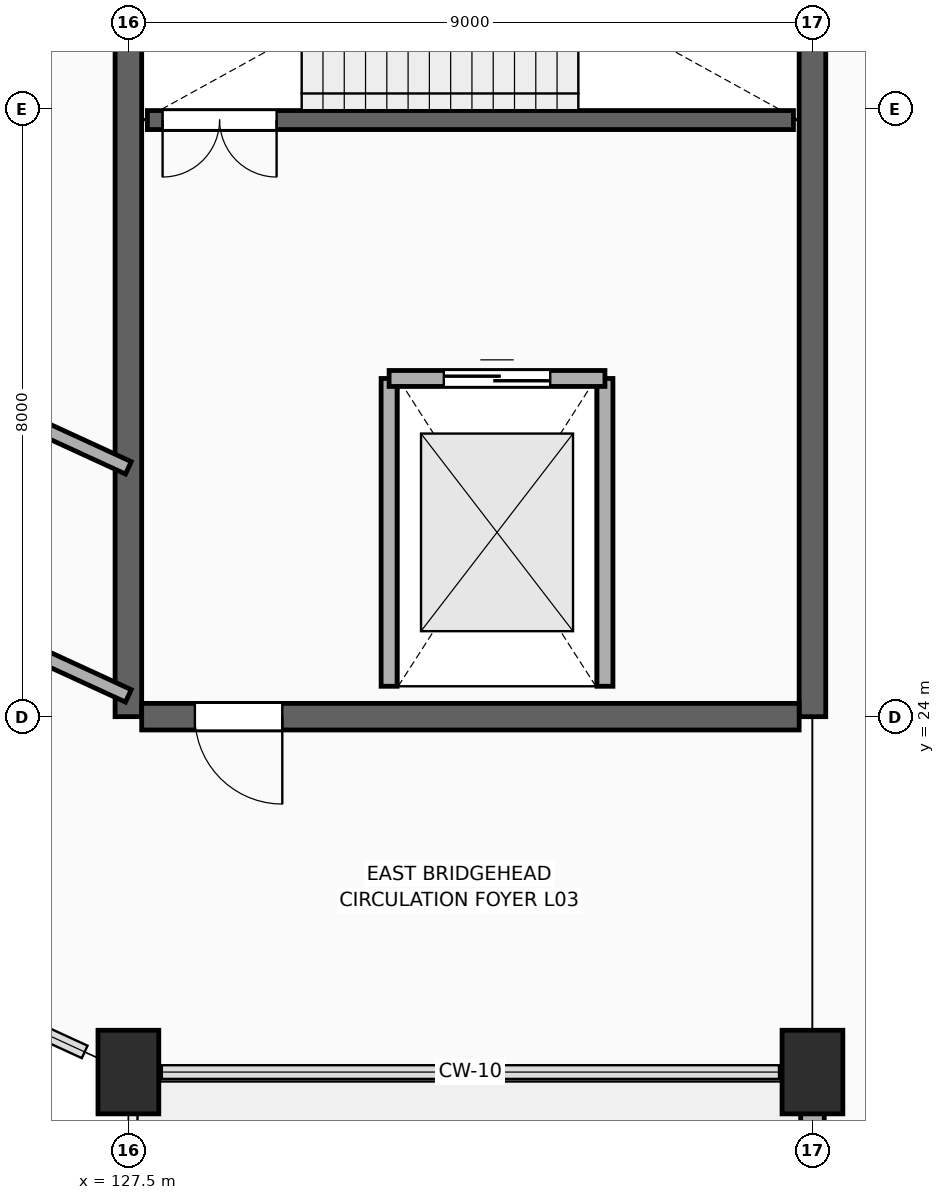
"""IFC4 building model, lengths in metres.
Left out: names, types, materials, properties, quantities, classifications, styles, units other than length and angle.
Written with IfcOpenShell. Run it as: python <this file> out.ifc"""

import sys

from ifc_helpers import new_model, si_unit, direction, frame, frame_2d, origin, origin_2d, place, context, subcontext, project, spatial, rectangle, extrude, element, fill, save


model = new_model("IFC4")
c1 = context("Model", 3, precision=1e-05, world=origin(), true_north=direction((0.0, 1.0)))
c2 = subcontext(c1, "Body", "Model", "MODEL_VIEW")
j1 = project(units=[si_unit("LENGTHUNIT", "METRE"), si_unit("PLANEANGLEUNIT", "RADIAN")], contexts=[c1])
p1 = place(None, origin())
s1 = spatial("IfcSite", under=j1, at=p1, CompositionType="ELEMENT")
p2 = place(p1, origin())
s2 = spatial("IfcBuilding", under=s1, at=p2, CompositionType="ELEMENT")
p3 = place(p2, frame((0.0, 0.0, 15.0)))
s3 = spatial("IfcBuildingStorey", under=s2, at=p3, CompositionType="ELEMENT", Elevation=15.0)
for number, where, z_axis, x_axis in (
    (1, (127.5, 24.0, 0.0), (0.0, 0.0, 1.0), (0.0, 1.0, 0.0)),
    (2, (136.5, 24.0, 0.0), (0.0, 0.0, 1.0), (0.0, 1.0, 0.0)),
):
    element("IfcWall", number, at=place(p3, frame(where, z_axis=z_axis, x_axis=x_axis)), inside=s3, PredefinedType="SHEAR", context=c2, shape_type="SweptSolid", body=[
        extrude(rectangle(XDim=12.8, YDim=0.35, at=frame_2d((6.4, 0.0))), origin(), (0.0, 0.0, 1.0), 4.64),
    ])
p4 = place(p3, frame((127.675, 24.0, 0.0), z_axis=(0.0, 0.0, 1.0), x_axis=(1.0, 0.0, 0.0)))
e3 = element("IfcWall", 3, at=p4, inside=s3, PredefinedType="SHEAR", context=c2, shape_type="SweptSolid", body=[
    extrude(rectangle(XDim=8.65, YDim=0.35, at=frame_2d((4.325, 0.0))), origin(), (0.0, 0.0, 1.0), 4.64),
])
p5 = place(p4, frame((0.7, 0.0, 0.0)))
e4 = element("IfcOpeningElement", 4, at=p5, cuts=e3, PredefinedType="OPENING", context=c2, shape_type="SweptSolid", body=[
    extrude(rectangle(XDim=1.15, YDim=2.2, at=frame_2d((0.575, 1.1))), frame((0.0, 0.187, 0.0), z_axis=(0.0, -1.0, 0.0), x_axis=(1.0, 0.0, 0.0)), (0.0, 0.0, 1.0), 0.374),
])
p6 = place(p3, frame((127.75, 31.85, 0.0), z_axis=(0.0, 0.0, 1.0), x_axis=(1.0, 0.0, 0.0)))
e5 = element("IfcWall", 5, at=p6, inside=s3, PredefinedType="STANDARD", context=c2, shape_type="SweptSolid", body=[
    extrude(rectangle(XDim=8.5, YDim=0.25, at=frame_2d((4.25, 0.0))), origin(), (0.0, 0.0, 1.0), 4.64),
])
p7 = place(p6, frame((0.2, 0.0, 0.0)))
e6 = element("IfcOpeningElement", 6, at=p7, cuts=e5, PredefinedType="OPENING", context=c2, shape_type="SweptSolid", body=[
    extrude(rectangle(XDim=1.5, YDim=2.2, at=frame_2d((0.75, 1.1))), frame((0.0, 0.137, 0.0), z_axis=(0.0, -1.0, 0.0), x_axis=(1.0, 0.0, 0.0)), (0.0, 0.0, 1.0), 0.274),
])
for number, where, z_axis, x_axis in (
    (7, (130.93, 24.4, 0.0), (0.0, 0.0, 1.0), (0.0, 1.0, 0.0)),
    (8, (133.77, 24.4, 0.0), (0.0, 0.0, 1.0), (0.0, 1.0, 0.0)),
):
    element("IfcWall", number, at=place(p3, frame(where, z_axis=z_axis, x_axis=x_axis)), inside=s3, PredefinedType="PARTITIONING", context=c2, shape_type="SweptSolid", body=[
        extrude(rectangle(XDim=4.05, YDim=0.21, at=frame_2d((2.025, 0.0))), origin(), (0.0, 0.0, 1.0), 4.64),
    ])
p8 = place(p3, frame((130.93, 28.45, 0.0), z_axis=(0.0, 0.0, 1.0), x_axis=(1.0, 0.0, 0.0)))
e9 = element("IfcWall", 9, at=p8, inside=s3, PredefinedType="PARTITIONING", context=c2, shape_type="SweptSolid", body=[
    extrude(rectangle(XDim=2.84, YDim=0.21, at=frame_2d((1.42, 0.0))), origin(), (0.0, 0.0, 1.0), 4.64),
])
p9 = place(p8, frame((0.72, 0.0, 0.0)))
e10 = element("IfcOpeningElement", 10, at=p9, cuts=e9, PredefinedType="OPENING", context=c2, shape_type="SweptSolid", body=[
    extrude(rectangle(XDim=1.4, YDim=2.35, at=frame_2d((0.7, 1.175))), frame((0.0, 0.117, 0.0), z_axis=(0.0, -1.0, 0.0), x_axis=(1.0, 0.0, 0.0)), (0.0, 0.0, 1.0), 0.234),
])
p10 = place(p3, frame((136.5, 19.324, 0.0), z_axis=(0.0, 0.0, 1.0), x_axis=(1.0, 0.0, 0.0)))
e11 = element("IfcColumn", 11, at=p10, inside=s3, PredefinedType="COLUMN", context=c2, shape_type="SweptSolid", body=[
    extrude(rectangle(XDim=0.8, YDim=1.1, at=origin_2d()), origin(), (0.0, 0.0, 1.0), 4.53),
])
p11 = place(p3, frame((127.5, 19.324, 0.0), z_axis=(0.0, 0.0, 1.0), x_axis=(1.0, 0.0, 0.0)))
e12 = element("IfcColumn", 12, at=p11, inside=s3, PredefinedType="COLUMN", context=c2, shape_type="SweptSolid", body=[
    extrude(rectangle(XDim=0.8, YDim=1.1, at=origin_2d()), origin(), (0.0, 0.0, 1.0), 4.54),
])
p12 = place(p3, frame((136.5, 8.0, 0.0), z_axis=(0.0, 0.0, 1.0), x_axis=(0.0, 1.0, 0.0)))
e13 = element("IfcWall", 13, at=p12, inside=s3, PredefinedType="STANDARD", context=c2, shape_type="SweptSolid", body=[
    extrude(rectangle(XDim=11.324, YDim=0.31, at=frame_2d((5.662, 0.0))), origin(), (0.0, 0.0, 1.0), 4.268),
])
p13 = place(p12, frame((2.231, 0.0, 1.1)))
e14 = element("IfcOpeningElement", 14, at=p13, cuts=e13, PredefinedType="OPENING", context=c2, shape_type="SweptSolid", body=[
    extrude(rectangle(XDim=1.2, YDim=2.2, at=frame_2d((0.6, 1.1))), frame((0.0, 0.167, 0.0), z_axis=(0.0, -1.0, 0.0), x_axis=(1.0, 0.0, 0.0)), (0.0, 0.0, 1.0), 0.334),
])
p14 = place(p12, frame((7.893, 0.0, 1.1)))
e15 = element("IfcOpeningElement", 15, at=p14, cuts=e13, PredefinedType="OPENING", context=c2, shape_type="SweptSolid", body=[
    extrude(rectangle(XDim=1.2, YDim=2.2, at=frame_2d((0.6, 1.1))), frame((0.0, 0.167, 0.0), z_axis=(0.0, -1.0, 0.0), x_axis=(1.0, 0.0, 0.0)), (0.0, 0.0, 1.0), 0.334),
])
p15 = place(p3, frame((123.25, 26.229, 0.0), z_axis=(0.0, 0.0, 1.0), x_axis=(0.908484112169, -0.417919391673, 0.0)))
e16 = element("IfcWall", 16, at=p15, inside=s3, PredefinedType="PARTITIONING", context=c2, shape_type="SweptSolid", body=[
    extrude(rectangle(XDim=4.678, YDim=0.18, at=frame_2d((2.339, 0.0))), origin(), (0.0, 0.0, 1.0), 3.668),
])
p16 = place(p3, frame((123.25, 29.229, 0.0), z_axis=(0.0, 0.0, 1.0), x_axis=(0.908484112169, -0.417919391673, 0.0)))
e17 = element("IfcWall", 17, at=p16, inside=s3, PredefinedType="PARTITIONING", context=c2, shape_type="SweptSolid", body=[
    extrude(rectangle(XDim=4.678, YDim=0.18, at=frame_2d((2.339, 0.0))), origin(), (0.0, 0.0, 1.0), 3.668),
])
p17 = place(p16, frame((1.45, 0.0, 0.0)))
e18 = element("IfcOpeningElement", 18, at=p17, cuts=e17, PredefinedType="OPENING", context=c2, shape_type="SweptSolid", body=[
    extrude(rectangle(XDim=0.95, YDim=2.15, at=frame_2d((0.475, 1.075))), frame((0.0, 0.102, 0.0), z_axis=(0.0, -1.0, 0.0), x_axis=(1.0, 0.0, 0.0)), (0.0, 0.0, 1.0), 0.204),
])
p18 = place(p7, frame((1.5, 0.0, 0.0), z_axis=(0.0, 0.0, 1.0), x_axis=(-1.0, 0.0, 0.0)))
e19 = element("IfcDoor", 19, at=p18, inside=s3, OperationType="DOUBLE_DOOR_SINGLE_SWING", PredefinedType="DOOR", context=c2, shape_type="SweptSolid", body=[
    extrude(rectangle(XDim=1.5, YDim=2.2, at=frame_2d((0.75, 1.1))), frame((0.0, 0.025, 0.0), z_axis=(0.0, -1.0, 0.0), x_axis=(1.0, 0.0, 0.0)), (0.0, 0.0, 1.0), 0.05),
])
fill(e6, e19)
p19 = place(p9, origin())
e20 = element("IfcDoor", 20, at=p19, inside=s3, OperationType="DOUBLE_DOOR_SLIDING", PredefinedType="DOOR", context=c2, shape_type="SweptSolid", body=[
    extrude(rectangle(XDim=1.4, YDim=2.35, at=frame_2d((0.7, 1.175))), frame((0.0, 0.025, 0.0), z_axis=(0.0, -1.0, 0.0), x_axis=(1.0, 0.0, 0.0)), (0.0, 0.0, 1.0), 0.05),
])
fill(e10, e20)
p20 = place(p5, frame((1.15, 0.0, 0.0), z_axis=(0.0, 0.0, 1.0), x_axis=(-1.0, 0.0, 0.0)))
e21 = element("IfcDoor", 21, at=p20, inside=s3, OperationType="SINGLE_SWING_RIGHT", PredefinedType="DOOR", context=c2, shape_type="SweptSolid", body=[
    extrude(rectangle(XDim=1.15, YDim=2.2, at=frame_2d((0.575, 1.1))), frame((0.0, 0.025, 0.0), z_axis=(0.0, -1.0, 0.0), x_axis=(1.0, 0.0, 0.0)), (0.0, 0.0, 1.0), 0.05),
])
fill(e4, e21)
save(model, sys.argv[1])
